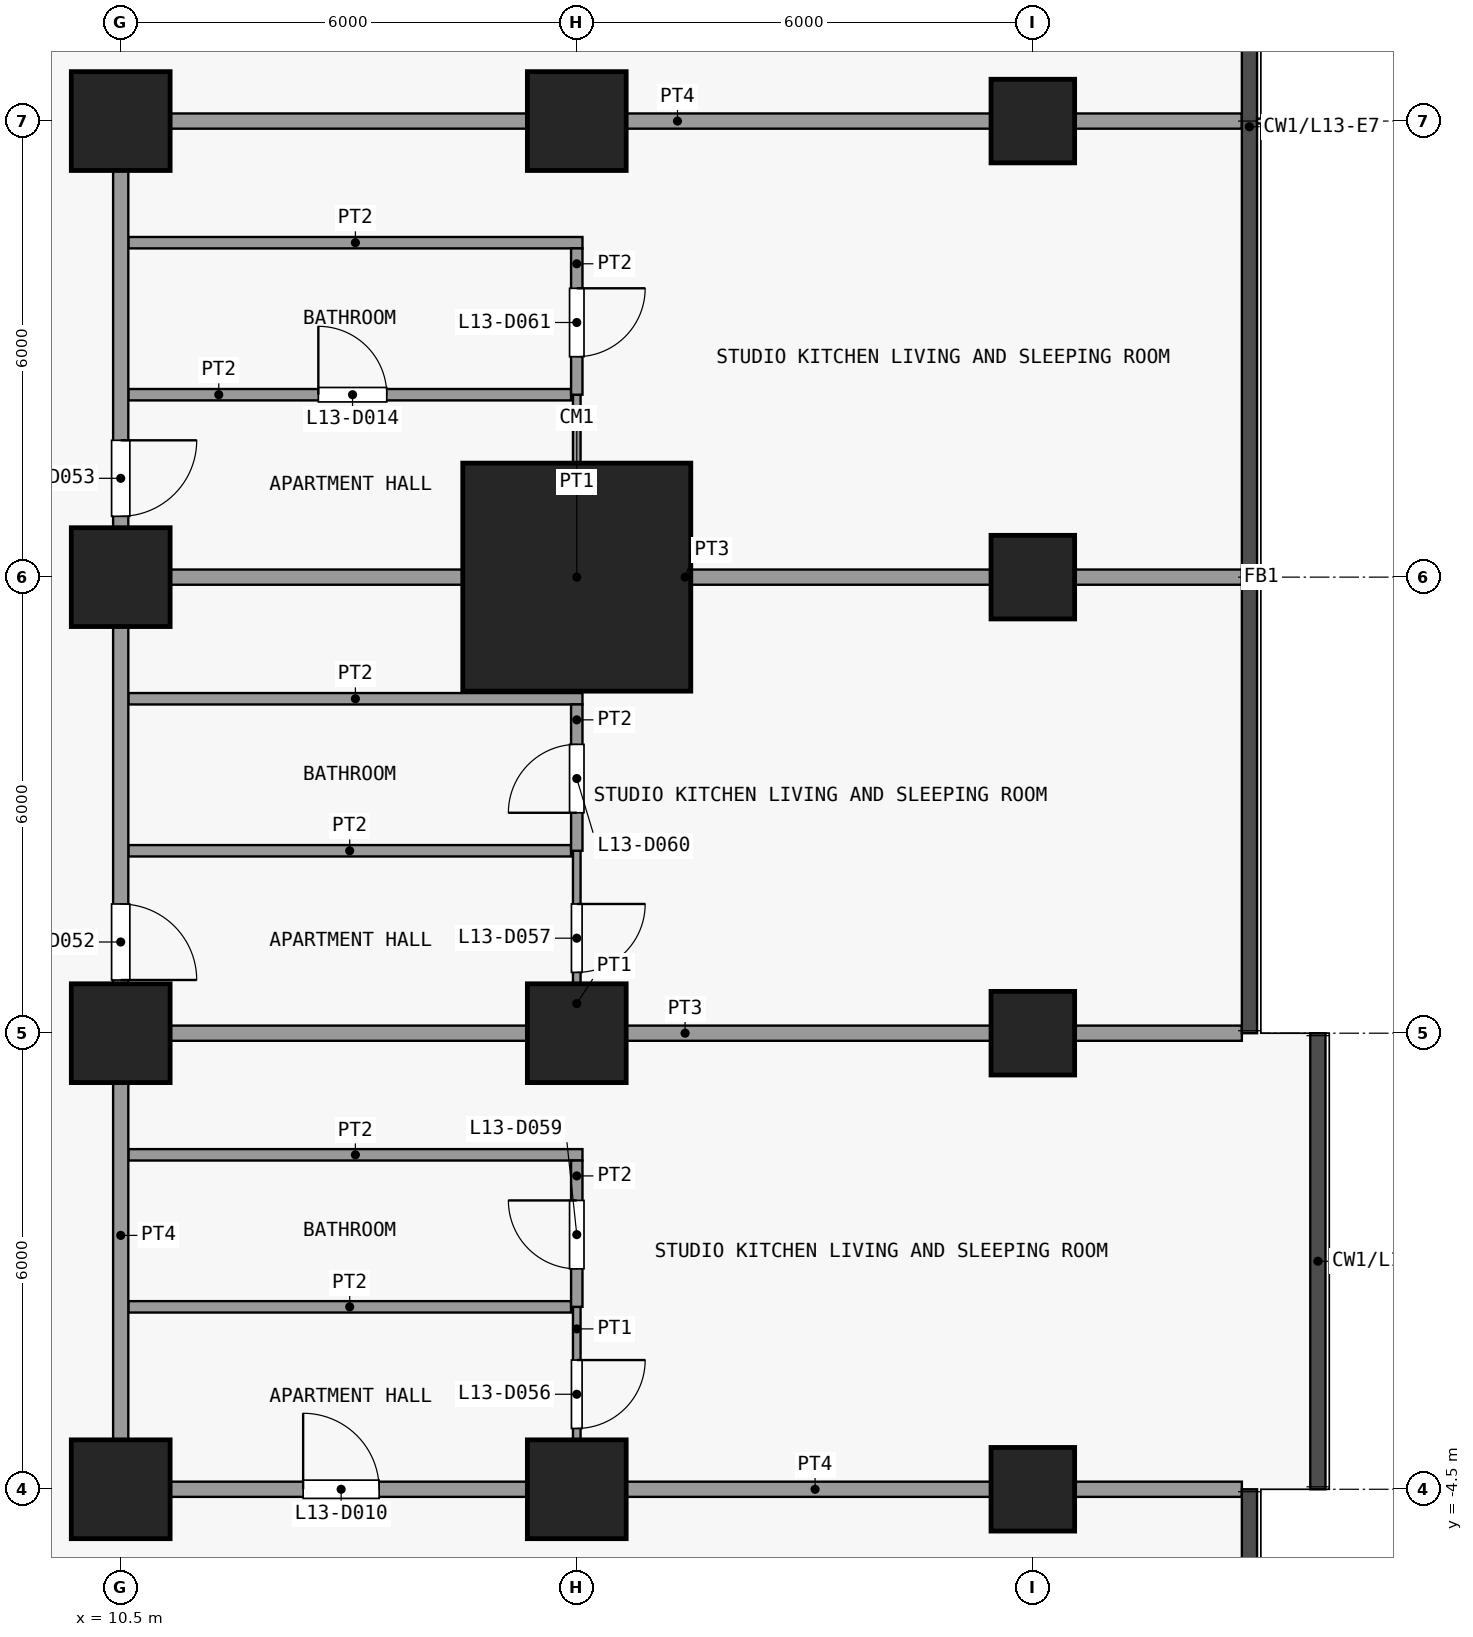
"""IFC4 building model, lengths in metres.
Left out: names, types, materials, properties, quantities, classifications, styles, units other than length and angle.
Written with IfcOpenShell. Run it as: python <this file> out.ifc"""

import sys

from ifc_helpers import new_model, si_unit, direction, frame, frame_2d, origin, origin_2d, place, context, subcontext, project, spatial, rectangle, extrude, element, fill, save


model = new_model("IFC4")
c1 = context("Model", 3, precision=1e-05, world=origin(), true_north=direction((0.0, 1.0)))
c2 = subcontext(c1, "Body", "Model", "MODEL_VIEW")
j1 = project(units=[si_unit("LENGTHUNIT", "METRE"), si_unit("PLANEANGLEUNIT", "RADIAN")], contexts=[c1])
p1 = place(None, origin())
s1 = spatial("IfcSite", under=j1, at=p1, CompositionType="ELEMENT")
p2 = place(p1, origin())
s2 = spatial("IfcBuilding", under=s1, at=p2, CompositionType="ELEMENT")
p3 = place(p2, frame((0.0, 0.0, 57.7)))
s3 = spatial("IfcBuildingStorey", under=s2, at=p3, CompositionType="ELEMENT", Elevation=57.7)
for number, where, z_axis, x_axis in (
    (1, (10.5, -4.5, 0.0), (0.0, 0.0, 1.0), (1.0, 0.0, 0.0)),
    (2, (10.5, 1.5, 0.0), (0.0, 0.0, 1.0), (1.0, 0.0, 0.0)),
    (3, (10.5, 7.5, 0.0), (0.0, 0.0, 1.0), (1.0, 0.0, 0.0)),
    (4, (10.5, 13.5, 0.0), (0.0, 0.0, 1.0), (1.0, 0.0, 0.0)),
    (5, (16.5, -4.5, 0.0), (0.0, 0.0, 1.0), (1.0, 0.0, 0.0)),
    (6, (16.5, 1.5, 0.0), (0.0, 0.0, 1.0), (1.0, 0.0, 0.0)),
):
    element("IfcColumn", number, at=place(p3, frame(where, z_axis=z_axis, x_axis=x_axis)), inside=s3, PredefinedType="COLUMN", context=c2, shape_type="SweptSolid", body=[
        extrude(rectangle(XDim=1.3, YDim=1.3, at=origin_2d()), origin(), (0.0, 0.0, 1.0), 3.6),
    ])
p4 = place(p3, frame((16.5, 7.5, 0.0), z_axis=(0.0, 0.0, 1.0), x_axis=(1.0, 0.0, 0.0)))
e7 = element("IfcColumn", 7, at=p4, inside=s3, PredefinedType="COLUMN", context=c2, shape_type="SweptSolid", body=[
    extrude(rectangle(XDim=3.0, YDim=3.0, at=origin_2d()), origin(), (0.0, 0.0, 1.0), 3.6),
])
p5 = place(p3, frame((16.5, 13.5, 0.0), z_axis=(0.0, 0.0, 1.0), x_axis=(1.0, 0.0, 0.0)))
e8 = element("IfcColumn", 8, at=p5, inside=s3, PredefinedType="COLUMN", context=c2, shape_type="SweptSolid", body=[
    extrude(rectangle(XDim=1.3, YDim=1.3, at=origin_2d()), origin(), (0.0, 0.0, 1.0), 3.6),
])
for number, where, z_axis, x_axis in (
    (9, (22.5, -4.5, 0.0), (0.0, 0.0, 1.0), (1.0, 0.0, 0.0)),
    (10, (22.5, 1.5, 0.0), (0.0, 0.0, 1.0), (1.0, 0.0, 0.0)),
    (11, (22.5, 7.5, 0.0), (0.0, 0.0, 1.0), (1.0, 0.0, 0.0)),
    (12, (22.5, 13.5, 0.0), (0.0, 0.0, 1.0), (1.0, 0.0, 0.0)),
):
    element("IfcColumn", number, at=place(p3, frame(where, z_axis=z_axis, x_axis=x_axis)), inside=s3, PredefinedType="COLUMN", context=c2, shape_type="SweptSolid", body=[
        extrude(rectangle(XDim=1.1, YDim=1.1, at=origin_2d()), origin(), (0.0, 0.0, 1.0), 3.6),
    ])
p6 = place(p3, frame((10.4, -4.5, 0.0), z_axis=(0.0, 0.0, 1.0), x_axis=(1.0, 0.0, 0.0)))
e13 = element("IfcWall", 13, at=p6, inside=s3, PredefinedType="PARTITIONING", context=c2, shape_type="SweptSolid", body=[
    extrude(rectangle(XDim=14.85, YDim=0.2, at=frame_2d((7.425, 0.0))), origin(), (0.0, 0.0, 1.0), 3.3),
])
p7 = place(p6, frame((2.5, 0.0, 0.0)))
e14 = element("IfcOpeningElement", 14, at=p7, cuts=e13, PredefinedType="OPENING", context=c2, shape_type="SweptSolid", body=[
    extrude(rectangle(XDim=1.0, YDim=2.1, at=frame_2d((0.5, 1.05))), frame((0.0, 0.11, 0.0), z_axis=(0.0, -1.0, 0.0), x_axis=(1.0, 0.0, 0.0)), (0.0, 0.0, 1.0), 0.22),
])
p8 = place(p3, frame((10.6, -2.1, 0.0), z_axis=(0.0, 0.0, 1.0), x_axis=(1.0, 0.0, 0.0)))
e15 = element("IfcWall", 15, at=p8, inside=s3, PredefinedType="PARTITIONING", context=c2, shape_type="SweptSolid", body=[
    extrude(rectangle(XDim=5.825, YDim=0.15, at=frame_2d((2.913, 0.0))), origin(), (0.0, 0.0, 1.0), 3.3),
])
p9 = place(p3, frame((10.6, -0.1, 0.0), z_axis=(0.0, 0.0, 1.0), x_axis=(1.0, 0.0, 0.0)))
e16 = element("IfcWall", 16, at=p9, inside=s3, PredefinedType="PARTITIONING", context=c2, shape_type="SweptSolid", body=[
    extrude(rectangle(XDim=5.975, YDim=0.15, at=frame_2d((2.987, 0.0))), origin(), (0.0, 0.0, 1.0), 3.3),
])
p10 = place(p3, frame((10.6, 1.5, 0.0), z_axis=(0.0, 0.0, 1.0), x_axis=(1.0, 0.0, 0.0)))
e17 = element("IfcWall", 17, at=p10, inside=s3, PredefinedType="PARTITIONING", context=c2, shape_type="SweptSolid", body=[
    extrude(rectangle(XDim=14.65, YDim=0.2, at=frame_2d((7.325, 0.0))), origin(), (0.0, 0.0, 1.0), 3.3),
])
p11 = place(p3, frame((10.6, 3.9, 0.0), z_axis=(0.0, 0.0, 1.0), x_axis=(1.0, 0.0, 0.0)))
e18 = element("IfcWall", 18, at=p11, inside=s3, PredefinedType="PARTITIONING", context=c2, shape_type="SweptSolid", body=[
    extrude(rectangle(XDim=5.825, YDim=0.15, at=frame_2d((2.913, 0.0))), origin(), (0.0, 0.0, 1.0), 3.3),
])
p12 = place(p3, frame((10.6, 5.9, 0.0), z_axis=(0.0, 0.0, 1.0), x_axis=(1.0, 0.0, 0.0)))
e19 = element("IfcWall", 19, at=p12, inside=s3, PredefinedType="PARTITIONING", context=c2, shape_type="SweptSolid", body=[
    extrude(rectangle(XDim=5.975, YDim=0.15, at=frame_2d((2.987, 0.0))), origin(), (0.0, 0.0, 1.0), 3.3),
])
p13 = place(p3, frame((10.6, 7.5, 0.0), z_axis=(0.0, 0.0, 1.0), x_axis=(1.0, 0.0, 0.0)))
e20 = element("IfcWall", 20, at=p13, inside=s3, PredefinedType="PARTITIONING", context=c2, shape_type="SweptSolid", body=[
    extrude(rectangle(XDim=14.65, YDim=0.2, at=frame_2d((7.325, 0.0))), origin(), (0.0, 0.0, 1.0), 3.3),
])
p14 = place(p3, frame((10.6, 9.9, 0.0), z_axis=(0.0, 0.0, 1.0), x_axis=(1.0, 0.0, 0.0)))
e21 = element("IfcWall", 21, at=p14, inside=s3, PredefinedType="PARTITIONING", context=c2, shape_type="SweptSolid", body=[
    extrude(rectangle(XDim=5.825, YDim=0.15, at=frame_2d((2.913, 0.0))), origin(), (0.0, 0.0, 1.0), 3.3),
])
p15 = place(p14, frame((2.5, 0.0, 0.0)))
e22 = element("IfcOpeningElement", 22, at=p15, cuts=e21, PredefinedType="OPENING", context=c2, shape_type="SweptSolid", body=[
    extrude(rectangle(XDim=0.9, YDim=2.1, at=frame_2d((0.45, 1.05))), frame((0.0, 0.085, 0.0), z_axis=(0.0, -1.0, 0.0), x_axis=(1.0, 0.0, 0.0)), (0.0, 0.0, 1.0), 0.17),
])
p16 = place(p3, frame((10.6, 11.9, 0.0), z_axis=(0.0, 0.0, 1.0), x_axis=(1.0, 0.0, 0.0)))
e23 = element("IfcWall", 23, at=p16, inside=s3, PredefinedType="PARTITIONING", context=c2, shape_type="SweptSolid", body=[
    extrude(rectangle(XDim=5.975, YDim=0.15, at=frame_2d((2.987, 0.0))), origin(), (0.0, 0.0, 1.0), 3.3),
])
p17 = place(p3, frame((10.4, 13.5, 0.0), z_axis=(0.0, 0.0, 1.0), x_axis=(1.0, 0.0, 0.0)))
e24 = element("IfcWall", 24, at=p17, inside=s3, PredefinedType="PARTITIONING", context=c2, shape_type="SweptSolid", body=[
    extrude(rectangle(XDim=14.85, YDim=0.2, at=frame_2d((7.425, 0.0))), origin(), (0.0, 0.0, 1.0), 3.3),
])
p18 = place(p3, frame((10.5, -4.4, 0.0), z_axis=(0.0, 0.0, 1.0), x_axis=(0.0, 1.0, 0.0)))
e25 = element("IfcWall", 25, at=p18, inside=s3, PredefinedType="PARTITIONING", context=c2, shape_type="SweptSolid", body=[
    extrude(rectangle(XDim=17.8, YDim=0.2, at=frame_2d((8.9, 0.0))), origin(), (0.0, 0.0, 1.0), 3.3),
])
p19 = place(p18, frame((6.6, 0.0, 0.0)))
e26 = element("IfcOpeningElement", 26, at=p19, cuts=e25, PredefinedType="OPENING", context=c2, shape_type="SweptSolid", body=[
    extrude(rectangle(XDim=1.0, YDim=2.1, at=frame_2d((0.5, 1.05))), frame((0.0, 0.11, 0.0), z_axis=(0.0, -1.0, 0.0), x_axis=(1.0, 0.0, 0.0)), (0.0, 0.0, 1.0), 0.22),
])
p20 = place(p18, frame((12.7, 0.0, 0.0)))
e27 = element("IfcOpeningElement", 27, at=p20, cuts=e25, PredefinedType="OPENING", context=c2, shape_type="SweptSolid", body=[
    extrude(rectangle(XDim=1.0, YDim=2.1, at=frame_2d((0.5, 1.05))), frame((0.0, 0.11, 0.0), z_axis=(0.0, -1.0, 0.0), x_axis=(1.0, 0.0, 0.0)), (0.0, 0.0, 1.0), 0.22),
])
p21 = place(p3, frame((16.5, -4.4, 0.0), z_axis=(0.0, 0.0, 1.0), x_axis=(0.0, 1.0, 0.0)))
e28 = element("IfcWall", 28, at=p21, inside=s3, PredefinedType="PARTITIONING", context=c2, shape_type="SweptSolid", body=[
    extrude(rectangle(XDim=2.3, YDim=0.1, at=frame_2d((1.15, 0.0))), origin(), (0.0, 0.0, 1.0), 3.3),
])
p22 = place(p21, frame((0.7, 0.0, 0.0)))
e29 = element("IfcOpeningElement", 29, at=p22, cuts=e28, PredefinedType="OPENING", context=c2, shape_type="SweptSolid", body=[
    extrude(rectangle(XDim=0.9, YDim=2.1, at=frame_2d((0.45, 1.05))), frame((0.0, 0.06, 0.0), z_axis=(0.0, -1.0, 0.0), x_axis=(1.0, 0.0, 0.0)), (0.0, 0.0, 1.0), 0.12),
])
p23 = place(p3, frame((16.5, 1.6, 0.0), z_axis=(0.0, 0.0, 1.0), x_axis=(0.0, 1.0, 0.0)))
e30 = element("IfcWall", 30, at=p23, inside=s3, PredefinedType="PARTITIONING", context=c2, shape_type="SweptSolid", body=[
    extrude(rectangle(XDim=2.3, YDim=0.1, at=frame_2d((1.15, 0.0))), origin(), (0.0, 0.0, 1.0), 3.3),
])
p24 = place(p23, frame((0.7, 0.0, 0.0)))
e31 = element("IfcOpeningElement", 31, at=p24, cuts=e30, PredefinedType="OPENING", context=c2, shape_type="SweptSolid", body=[
    extrude(rectangle(XDim=0.9, YDim=2.1, at=frame_2d((0.45, 1.05))), frame((0.0, 0.06, 0.0), z_axis=(0.0, -1.0, 0.0), x_axis=(1.0, 0.0, 0.0)), (0.0, 0.0, 1.0), 0.12),
])
p25 = place(p3, frame((16.5, 7.6, 0.0), z_axis=(0.0, 0.0, 1.0), x_axis=(0.0, 1.0, 0.0)))
e32 = element("IfcWall", 32, at=p25, inside=s3, PredefinedType="PARTITIONING", context=c2, shape_type="SweptSolid", body=[
    extrude(rectangle(XDim=2.3, YDim=0.1, at=frame_2d((1.15, 0.0))), origin(), (0.0, 0.0, 1.0), 3.3),
])
p26 = place(p3, frame((16.5, -2.1, 0.0), z_axis=(0.0, 0.0, 1.0), x_axis=(0.0, 1.0, 0.0)))
e33 = element("IfcWall", 33, at=p26, inside=s3, PredefinedType="PARTITIONING", context=c2, shape_type="SweptSolid", body=[
    extrude(rectangle(XDim=1.925, YDim=0.15, at=frame_2d((0.962, 0.0))), origin(), (0.0, 0.0, 1.0), 3.3),
])
p27 = place(p26, frame((0.5, 0.0, 0.0)))
e34 = element("IfcOpeningElement", 34, at=p27, cuts=e33, PredefinedType="OPENING", context=c2, shape_type="SweptSolid", body=[
    extrude(rectangle(XDim=0.9, YDim=2.1, at=frame_2d((0.45, 1.05))), frame((0.0, 0.085, 0.0), z_axis=(0.0, -1.0, 0.0), x_axis=(1.0, 0.0, 0.0)), (0.0, 0.0, 1.0), 0.17),
])
p28 = place(p3, frame((16.5, 3.9, 0.0), z_axis=(0.0, 0.0, 1.0), x_axis=(0.0, 1.0, 0.0)))
e35 = element("IfcWall", 35, at=p28, inside=s3, PredefinedType="PARTITIONING", context=c2, shape_type="SweptSolid", body=[
    extrude(rectangle(XDim=1.925, YDim=0.15, at=frame_2d((0.962, 0.0))), origin(), (0.0, 0.0, 1.0), 3.3),
])
p29 = place(p28, frame((0.5, 0.0, 0.0)))
e36 = element("IfcOpeningElement", 36, at=p29, cuts=e35, PredefinedType="OPENING", context=c2, shape_type="SweptSolid", body=[
    extrude(rectangle(XDim=0.9, YDim=2.1, at=frame_2d((0.45, 1.05))), frame((0.0, 0.085, 0.0), z_axis=(0.0, -1.0, 0.0), x_axis=(1.0, 0.0, 0.0)), (0.0, 0.0, 1.0), 0.17),
])
p30 = place(p3, frame((16.5, 9.9, 0.0), z_axis=(0.0, 0.0, 1.0), x_axis=(0.0, 1.0, 0.0)))
e37 = element("IfcWall", 37, at=p30, inside=s3, PredefinedType="PARTITIONING", context=c2, shape_type="SweptSolid", body=[
    extrude(rectangle(XDim=1.925, YDim=0.15, at=frame_2d((0.962, 0.0))), origin(), (0.0, 0.0, 1.0), 3.3),
])
p31 = place(p30, frame((0.5, 0.0, 0.0)))
e38 = element("IfcOpeningElement", 38, at=p31, cuts=e37, PredefinedType="OPENING", context=c2, shape_type="SweptSolid", body=[
    extrude(rectangle(XDim=0.9, YDim=2.1, at=frame_2d((0.45, 1.05))), frame((0.0, 0.085, 0.0), z_axis=(0.0, -1.0, 0.0), x_axis=(1.0, 0.0, 0.0)), (0.0, 0.0, 1.0), 0.17),
])
p32 = place(p7, origin())
e39 = element("IfcDoor", 39, at=p32, inside=s3, OperationType="SINGLE_SWING_RIGHT", PredefinedType="DOOR", context=c2, shape_type="SweptSolid", body=[
    extrude(rectangle(XDim=1.0, YDim=2.1, at=frame_2d((0.5, 1.05))), frame((0.0, 0.025, 0.0), z_axis=(0.0, -1.0, 0.0), x_axis=(1.0, 0.0, 0.0)), (0.0, 0.0, 1.0), 0.05),
])
fill(e14, e39)
p33 = place(p15, origin())
e40 = element("IfcDoor", 40, at=p33, inside=s3, OperationType="SINGLE_SWING_RIGHT", PredefinedType="DOOR", context=c2, shape_type="SweptSolid", body=[
    extrude(rectangle(XDim=0.9, YDim=2.1, at=frame_2d((0.45, 1.05))), frame((0.0, 0.025, 0.0), z_axis=(0.0, -1.0, 0.0), x_axis=(1.0, 0.0, 0.0)), (0.0, 0.0, 1.0), 0.05),
])
fill(e22, e40)
p34 = place(p19, origin())
e41 = element("IfcDoor", 41, at=p34, inside=s3, OperationType="SINGLE_SWING_LEFT", PredefinedType="DOOR", context=c2, shape_type="SweptSolid", body=[
    extrude(rectangle(XDim=1.0, YDim=2.1, at=frame_2d((0.5, 1.05))), frame((0.0, 0.025, 0.0), z_axis=(0.0, -1.0, 0.0), x_axis=(1.0, 0.0, 0.0)), (0.0, 0.0, 1.0), 0.05),
])
fill(e26, e41)
p35 = place(p20, origin())
e42 = element("IfcDoor", 42, at=p35, inside=s3, OperationType="SINGLE_SWING_RIGHT", PredefinedType="DOOR", context=c2, shape_type="SweptSolid", body=[
    extrude(rectangle(XDim=1.0, YDim=2.1, at=frame_2d((0.5, 1.05))), frame((0.0, 0.025, 0.0), z_axis=(0.0, -1.0, 0.0), x_axis=(1.0, 0.0, 0.0)), (0.0, 0.0, 1.0), 0.05),
])
fill(e27, e42)
p36 = place(p22, origin())
e43 = element("IfcDoor", 43, at=p36, inside=s3, OperationType="SINGLE_SWING_RIGHT", PredefinedType="DOOR", context=c2, shape_type="SweptSolid", body=[
    extrude(rectangle(XDim=0.9, YDim=2.1, at=frame_2d((0.45, 1.05))), frame((0.0, 0.025, 0.0), z_axis=(0.0, -1.0, 0.0), x_axis=(1.0, 0.0, 0.0)), (0.0, 0.0, 1.0), 0.05),
])
fill(e29, e43)
p37 = place(p24, origin())
e44 = element("IfcDoor", 44, at=p37, inside=s3, OperationType="SINGLE_SWING_RIGHT", PredefinedType="DOOR", context=c2, shape_type="SweptSolid", body=[
    extrude(rectangle(XDim=0.9, YDim=2.1, at=frame_2d((0.45, 1.05))), frame((0.0, 0.025, 0.0), z_axis=(0.0, -1.0, 0.0), x_axis=(1.0, 0.0, 0.0)), (0.0, 0.0, 1.0), 0.05),
])
fill(e31, e44)
p38 = place(p27, origin())
e45 = element("IfcDoor", 45, at=p38, inside=s3, OperationType="SINGLE_SWING_LEFT", PredefinedType="DOOR", context=c2, shape_type="SweptSolid", body=[
    extrude(rectangle(XDim=0.9, YDim=2.1, at=frame_2d((0.45, 1.05))), frame((0.0, 0.025, 0.0), z_axis=(0.0, -1.0, 0.0), x_axis=(1.0, 0.0, 0.0)), (0.0, 0.0, 1.0), 0.05),
])
fill(e34, e45)
p39 = place(p29, origin())
e46 = element("IfcDoor", 46, at=p39, inside=s3, OperationType="SINGLE_SWING_RIGHT", PredefinedType="DOOR", context=c2, shape_type="SweptSolid", body=[
    extrude(rectangle(XDim=0.9, YDim=2.1, at=frame_2d((0.45, 1.05))), frame((0.0, 0.025, 0.0), z_axis=(0.0, -1.0, 0.0), x_axis=(1.0, 0.0, 0.0)), (0.0, 0.0, 1.0), 0.05),
])
fill(e36, e46)
p40 = place(p31, origin())
e47 = element("IfcDoor", 47, at=p40, inside=s3, OperationType="SINGLE_SWING_RIGHT", PredefinedType="DOOR", context=c2, shape_type="SweptSolid", body=[
    extrude(rectangle(XDim=0.9, YDim=2.1, at=frame_2d((0.45, 1.05))), frame((0.0, 0.025, 0.0), z_axis=(0.0, -1.0, 0.0), x_axis=(1.0, 0.0, 0.0)), (0.0, 0.0, 1.0), 0.05),
])
fill(e38, e47)
save(model, sys.argv[1])
